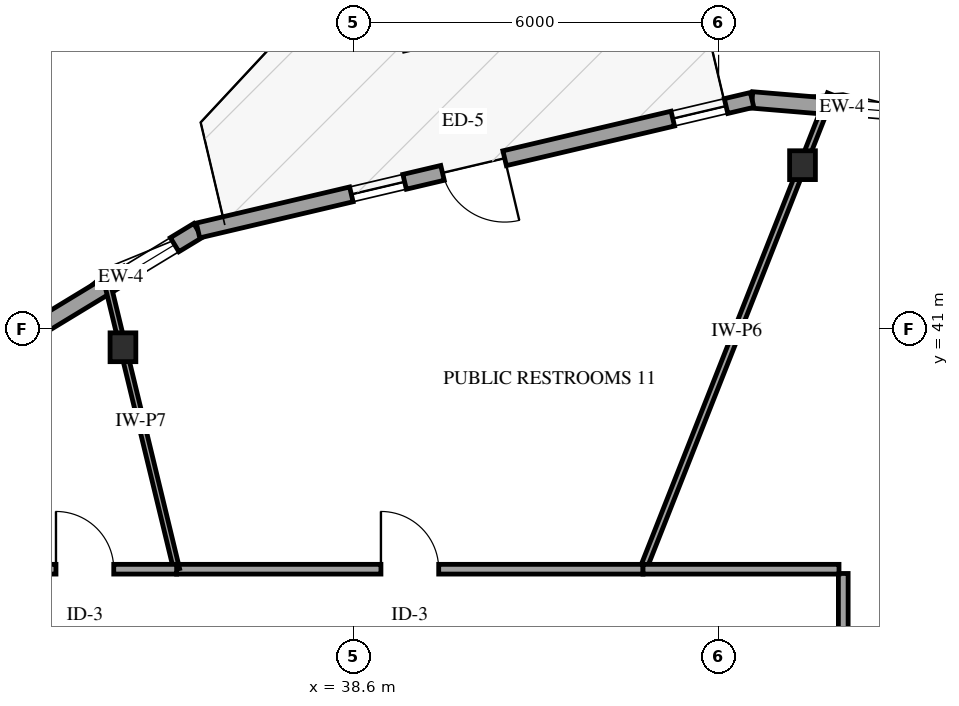
"""IFC4 building model, lengths in metres.
Left out: names, types, materials, properties, quantities, classifications, styles, units other than length and angle.
Written with IfcOpenShell. Run it as: python <this file> out.ifc"""

import sys

from ifc_helpers import new_model, si_unit, direction, frame, frame_2d, origin, origin_2d, place, context, subcontext, project, spatial, rectangle, i_section, extrude, element, fill, save


model = new_model("IFC4")
c1 = context("Model", 3, precision=1e-05, world=origin(), true_north=direction((0.0, 1.0)))
c2 = subcontext(c1, "Body", "Model", "MODEL_VIEW")
j1 = project(units=[si_unit("LENGTHUNIT", "METRE"), si_unit("PLANEANGLEUNIT", "RADIAN")], contexts=[c1])
p1 = place(None, origin())
s1 = spatial("IfcSite", under=j1, at=p1, CompositionType="ELEMENT")
p2 = place(p1, origin())
s2 = spatial("IfcBuilding", under=s1, at=p2, CompositionType="ELEMENT")
p3 = place(p2, frame((0.0, 0.0, 78.6)))
s3 = spatial("IfcBuildingStorey", under=s2, at=p3, CompositionType="ELEMENT", Elevation=78.6)
for number, where, z_axis, x_axis in (
    (1, (45.98, 43.694, 0.0), (0.0, 0.0, 1.0), (1.0, 0.0, 0.0)),
    (2, (34.804, 40.7, 0.0), (0.0, 0.0, 1.0), (1.0, 0.0, 0.0)),
):
    element("IfcColumn", number, at=place(p3, frame(where, z_axis=z_axis, x_axis=x_axis)), inside=s3, PredefinedType="COLUMN", context=c2, shape_type="SweptSolid", body=[
        extrude(i_section(OverallWidth=0.424, OverallDepth=0.474, WebThickness=0.048, FlangeThickness=0.077, FilletRadius=0.038, at=origin_2d()), origin(), (0.0, 0.0, 1.0), 4.0),
    ])
p4 = place(p3, frame((48.107, 44.522, 0.0), z_axis=(0.0, 0.0, 1.0), x_axis=(-0.996580856584, 0.082623218828, 0.0)))
e3 = element("IfcWall", 3, at=p4, inside=s3, PredefinedType="SOLIDWALL", context=c2, shape_type="SweptSolid", body=[
    extrude(rectangle(XDim=2.967, YDim=0.27, at=frame_2d((1.483, 0.0))), origin(), (0.0, 0.0, 1.0), 3.039),
])
p5 = place(p4, frame((0.45, 0.0, 0.75)))
e4 = element("IfcOpeningElement", 4, at=p5, cuts=e3, PredefinedType="OPENING", context=c2, shape_type="SweptSolid", body=[
    extrude(rectangle(XDim=0.9, YDim=1.5, at=frame_2d((0.45, 0.75))), frame((0.0, 0.145, 0.0), z_axis=(0.0, -1.0, 0.0), x_axis=(1.0, 0.0, 0.0)), (0.0, 0.0, 1.0), 0.29),
])
p6 = place(p3, frame((36.039, 42.62, 0.0), z_axis=(0.0, 0.0, 1.0), x_axis=(-0.854838363076, -0.518894375584, 0.0)))
e5 = element("IfcWall", 5, at=p6, inside=s3, PredefinedType="SOLIDWALL", context=c2, shape_type="SweptSolid", body=[
    extrude(rectangle(XDim=2.967, YDim=0.27, at=frame_2d((1.483, 0.0))), origin(), (0.0, 0.0, 1.0), 3.039),
])
p7 = place(p6, frame((0.45, 0.0, 0.75)))
e6 = element("IfcOpeningElement", 6, at=p7, cuts=e5, PredefinedType="OPENING", context=c2, shape_type="SweptSolid", body=[
    extrude(rectangle(XDim=0.9, YDim=1.5, at=frame_2d((0.45, 0.75))), frame((0.0, 0.145, 0.0), z_axis=(0.0, -1.0, 0.0), x_axis=(1.0, 0.0, 0.0)), (0.0, 0.0, 1.0), 0.29),
])
p8 = place(p3, frame((45.151, 44.767, 0.0), z_axis=(0.0, 0.0, 1.0), x_axis=(-0.973339472423, -0.229369290498, 0.0)))
e7 = element("IfcWall", 7, at=p8, inside=s3, PredefinedType="SOLIDWALL", context=c2, shape_type="SweptSolid", body=[
    extrude(rectangle(XDim=9.361, YDim=0.25, at=frame_2d((4.681, 0.0))), origin(), (0.0, 0.0, 1.0), 3.039),
])
p9 = place(p8, frame((4.181, 0.0, 0.0)))
e8 = element("IfcOpeningElement", 8, at=p9, cuts=e7, PredefinedType="OPENING", context=c2, shape_type="SweptSolid", body=[
    extrude(rectangle(XDim=1.05, YDim=2.15, at=frame_2d((0.525, 1.075))), frame((0.0, 0.135, 0.0), z_axis=(0.0, -1.0, 0.0), x_axis=(1.0, 0.0, 0.0)), (0.0, 0.0, 1.0), 0.27),
])
p10 = place(p8, frame((0.44, 0.0, 0.72)))
e9 = element("IfcOpeningElement", 9, at=p10, cuts=e7, PredefinedType="OPENING", context=c2, shape_type="SweptSolid", body=[
    extrude(rectangle(XDim=0.9, YDim=1.5, at=frame_2d((0.45, 0.75))), frame((0.0, 0.135, 0.0), z_axis=(0.0, -1.0, 0.0), x_axis=(1.0, 0.0, 0.0)), (0.0, 0.0, 1.0), 0.27),
])
p11 = place(p8, frame((5.871, 0.0, 0.72)))
e10 = element("IfcOpeningElement", 10, at=p11, cuts=e7, PredefinedType="OPENING", context=c2, shape_type="SweptSolid", body=[
    extrude(rectangle(XDim=0.9, YDim=1.5, at=frame_2d((0.45, 0.75))), frame((0.0, 0.135, 0.0), z_axis=(0.0, -1.0, 0.0), x_axis=(1.0, 0.0, 0.0)), (0.0, 0.0, 1.0), 0.27),
])
p12 = place(p3, frame((46.65, 31.442, 0.0), z_axis=(0.0, 0.0, 1.0), x_axis=(0.780803279634, 0.62477695101, 0.0)))
e11 = element("IfcWall", 11, at=p12, inside=s3, PredefinedType="PARTITIONING", context=c2, shape_type="SweptSolid", body=[
    extrude(rectangle(XDim=14.177, YDim=0.1, at=frame_2d((7.088, 0.0))), origin(), (0.0, 0.0, 1.0), 3.66),
])
p13 = place(p3, frame((43.357, 37.05, 0.0), z_axis=(0.0, 0.0, 1.0), x_axis=(0.36721814447, 0.930134847413, 0.0)))
e12 = element("IfcWall", 12, at=p13, inside=s3, PredefinedType="PARTITIONING", context=c2, shape_type="SweptSolid", body=[
    extrude(rectangle(XDim=8.401, YDim=0.11, at=frame_2d((4.2, 0.0))), origin(), (0.0, 0.0, 1.0), 2.955),
])
p14 = place(p3, frame((35.687, 37.05, 0.0), z_axis=(0.0, 0.0, 1.0), x_axis=(1.0, 0.0, 0.0)))
e13 = element("IfcWall", 13, at=p14, inside=s3, PredefinedType="PARTITIONING", context=c2, shape_type="SweptSolid", body=[
    extrude(rectangle(XDim=7.67, YDim=0.16, at=frame_2d((3.835, 0.0))), origin(), (0.0, 0.0, 1.0), 3.66),
])
p15 = place(p14, frame((3.36, 0.0, 0.0)))
e14 = element("IfcOpeningElement", 14, at=p15, cuts=e13, PredefinedType="OPENING", context=c2, shape_type="SweptSolid", body=[
    extrude(rectangle(XDim=0.95, YDim=2.15, at=frame_2d((0.475, 1.075))), frame((0.0, 0.09, 0.0), z_axis=(0.0, -1.0, 0.0), x_axis=(1.0, 0.0, 0.0)), (0.0, 0.0, 1.0), 0.18),
])
p16 = place(p3, frame((46.65, 36.98, 0.0), z_axis=(0.0, 0.0, 1.0), x_axis=(0.0, -1.0, 0.0)))
e15 = element("IfcWall", 15, at=p16, inside=s3, PredefinedType="PARTITIONING", context=c2, shape_type="SweptSolid", body=[
    extrude(rectangle(XDim=5.538, YDim=0.16, at=frame_2d((2.769, 0.0))), origin(), (0.0, 0.0, 1.0), 3.66),
])
p17 = place(p16, frame((2.294, 0.0, 0.0)))
e16 = element("IfcOpeningElement", 16, at=p17, cuts=e15, PredefinedType="OPENING", context=c2, shape_type="SweptSolid", body=[
    extrude(rectangle(XDim=0.95, YDim=2.15, at=frame_2d((0.475, 1.075))), frame((0.0, 0.09, 0.0), z_axis=(0.0, -1.0, 0.0), x_axis=(1.0, 0.0, 0.0)), (0.0, 0.0, 1.0), 0.18),
])
p18 = place(p3, frame((35.687, 37.05, 0.0), z_axis=(0.0, 0.0, 1.0), x_axis=(-0.235161687333, 0.971956264865, 0.0)))
e17 = element("IfcWall", 17, at=p18, inside=s3, PredefinedType="PARTITIONING", context=c2, shape_type="SweptSolid", body=[
    extrude(rectangle(XDim=5.022, YDim=0.1, at=frame_2d((2.511, 0.0))), origin(), (0.0, 0.0, 1.0), 2.955),
])
p19 = place(p3, frame((43.357, 37.05, 0.0), z_axis=(0.0, 0.0, 1.0), x_axis=(1.0, 0.0, 0.0)))
e18 = element("IfcWall", 18, at=p19, inside=s3, PredefinedType="PARTITIONING", context=c2, shape_type="SweptSolid", body=[
    extrude(rectangle(XDim=3.223, YDim=0.16, at=frame_2d((1.612, 0.0))), origin(), (0.0, 0.0, 1.0), 3.66),
])
p20 = place(p3, frame((32.67, 37.05, 0.0), z_axis=(0.0, 0.0, 1.0), x_axis=(1.0, 0.0, 0.0)))
e19 = element("IfcWall", 19, at=p20, inside=s3, PredefinedType="PARTITIONING", context=c2, shape_type="SweptSolid", body=[
    extrude(rectangle(XDim=3.017, YDim=0.16, at=frame_2d((1.509, 0.0))), origin(), (0.0, 0.0, 1.0), 3.66),
])
p21 = place(p20, frame((1.033, 0.0, 0.0)))
e20 = element("IfcOpeningElement", 20, at=p21, cuts=e19, PredefinedType="OPENING", context=c2, shape_type="SweptSolid", body=[
    extrude(rectangle(XDim=0.95, YDim=2.15, at=frame_2d((0.475, 1.075))), frame((0.0, 0.09, 0.0), z_axis=(0.0, -1.0, 0.0), x_axis=(1.0, 0.0, 0.0)), (0.0, 0.0, 1.0), 0.18),
])
p22 = place(p5, origin())
e21 = element("IfcWindow", 21, at=p22, inside=s3, PartitioningType="SINGLE_PANEL", PredefinedType="WINDOW", context=c2, shape_type="SweptSolid", body=[
    extrude(rectangle(XDim=0.9, YDim=1.5, at=frame_2d((0.45, 0.75))), frame((0.0, 0.03, 0.0), z_axis=(0.0, -1.0, 0.0), x_axis=(1.0, 0.0, 0.0)), (0.0, 0.0, 1.0), 0.06),
])
fill(e4, e21)
p23 = place(p7, origin())
e22 = element("IfcWindow", 22, at=p23, inside=s3, PartitioningType="SINGLE_PANEL", PredefinedType="WINDOW", context=c2, shape_type="SweptSolid", body=[
    extrude(rectangle(XDim=0.9, YDim=1.5, at=frame_2d((0.45, 0.75))), frame((0.0, 0.03, 0.0), z_axis=(0.0, -1.0, 0.0), x_axis=(1.0, 0.0, 0.0)), (0.0, 0.0, 1.0), 0.06),
])
fill(e6, e22)
p24 = place(p9, origin())
e23 = element("IfcDoor", 23, at=p24, inside=s3, OperationType="SINGLE_SWING_LEFT", PredefinedType="DOOR", context=c2, shape_type="SweptSolid", body=[
    extrude(rectangle(XDim=1.05, YDim=2.15, at=frame_2d((0.525, 1.075))), frame((0.0, 0.025, 0.0), z_axis=(0.0, -1.0, 0.0), x_axis=(1.0, 0.0, 0.0)), (0.0, 0.0, 1.0), 0.05),
])
fill(e8, e23)
p25 = place(p10, origin())
e24 = element("IfcWindow", 24, at=p25, inside=s3, PartitioningType="SINGLE_PANEL", PredefinedType="WINDOW", context=c2, shape_type="SweptSolid", body=[
    extrude(rectangle(XDim=0.9, YDim=1.5, at=frame_2d((0.45, 0.75))), frame((0.0, 0.03, 0.0), z_axis=(0.0, -1.0, 0.0), x_axis=(1.0, 0.0, 0.0)), (0.0, 0.0, 1.0), 0.06),
])
fill(e9, e24)
p26 = place(p11, origin())
e25 = element("IfcWindow", 25, at=p26, inside=s3, PartitioningType="SINGLE_PANEL", PredefinedType="WINDOW", context=c2, shape_type="SweptSolid", body=[
    extrude(rectangle(XDim=0.9, YDim=1.5, at=frame_2d((0.45, 0.75))), frame((0.0, 0.03, 0.0), z_axis=(0.0, -1.0, 0.0), x_axis=(1.0, 0.0, 0.0)), (0.0, 0.0, 1.0), 0.06),
])
fill(e10, e25)
p27 = place(p15, origin())
e26 = element("IfcDoor", 26, at=p27, inside=s3, OperationType="SINGLE_SWING_LEFT", PredefinedType="DOOR", context=c2, shape_type="SweptSolid", body=[
    extrude(rectangle(XDim=0.95, YDim=2.15, at=frame_2d((0.475, 1.075))), frame((0.0, 0.025, 0.0), z_axis=(0.0, -1.0, 0.0), x_axis=(1.0, 0.0, 0.0)), (0.0, 0.0, 1.0), 0.05),
])
fill(e14, e26)
p28 = place(p21, origin())
e27 = element("IfcDoor", 27, at=p28, inside=s3, OperationType="SINGLE_SWING_LEFT", PredefinedType="DOOR", context=c2, shape_type="SweptSolid", body=[
    extrude(rectangle(XDim=0.95, YDim=2.15, at=frame_2d((0.475, 1.075))), frame((0.0, 0.025, 0.0), z_axis=(0.0, -1.0, 0.0), x_axis=(1.0, 0.0, 0.0)), (0.0, 0.0, 1.0), 0.05),
])
fill(e20, e27)
save(model, sys.argv[1])
